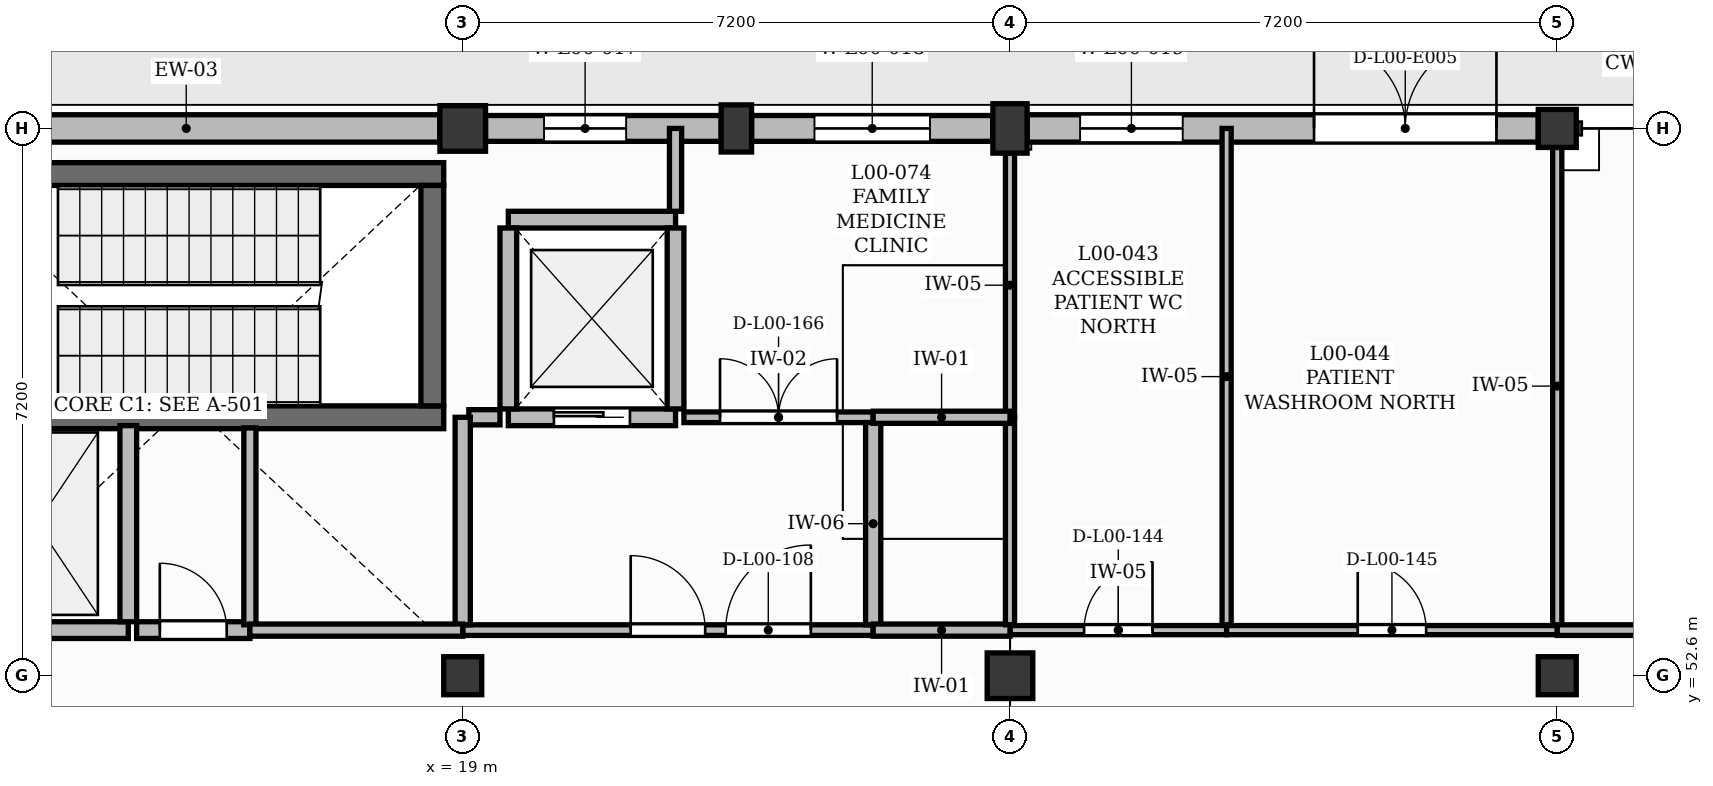
"""IFC4 building model, lengths in metres.
Left out: names, types, materials, properties, quantities, classifications, styles, units other than length and angle.
Written with IfcOpenShell. Run it as: python <this file> out.ifc"""

import sys

from ifc_helpers import new_model, si_unit, direction, frame, frame_2d, origin, origin_2d, place, context, subcontext, project, spatial, rectangle, extrude, element, fill, save


model = new_model("IFC4")
c1 = context("Model", 3, precision=1e-05, world=origin(), true_north=direction((0.0, 1.0)))
c2 = subcontext(c1, "Body", "Model", "MODEL_VIEW")
j1 = project(units=[si_unit("LENGTHUNIT", "METRE"), si_unit("PLANEANGLEUNIT", "RADIAN")], contexts=[c1])
p1 = place(None, origin())
s1 = spatial("IfcSite", under=j1, at=p1, CompositionType="ELEMENT")
p2 = place(p1, origin())
s2 = spatial("IfcBuilding", under=s1, at=p2, CompositionType="ELEMENT")
p3 = place(p2, origin())
s3 = spatial("IfcBuildingStorey", under=s2, at=p3, CompositionType="ELEMENT", Elevation=0.0)
p4 = place(p3, frame((19.0, 52.6, 0.0), z_axis=(0.0, 0.0, 1.0), x_axis=(1.0, 0.0, 0.0)))
e1 = element("IfcColumn", 1, at=p4, inside=s3, PredefinedType="COLUMN", context=c2, shape_type="SweptSolid", body=[
    extrude(rectangle(XDim=0.5, YDim=0.5, at=origin_2d()), origin(), (0.0, 0.0, 1.0), 4.2),
])
for number, where, z_axis, x_axis in (
    (2, (19.0, 59.8, 0.0), (0.0, 0.0, 1.0), (1.0, 0.0, 0.0)),
    (3, (26.2, 52.6, 0.0), (0.0, 0.0, 1.0), (1.0, 0.0, 0.0)),
):
    element("IfcColumn", number, at=place(p3, frame(where, z_axis=z_axis, x_axis=x_axis)), inside=s3, PredefinedType="COLUMN", context=c2, shape_type="SweptSolid", body=[
        extrude(rectangle(XDim=0.6, YDim=0.6, at=origin_2d()), origin(), (0.0, 0.0, 1.0), 4.2),
    ])
p5 = place(p3, frame((26.2, 59.8, 0.0), z_axis=(0.0, 0.0, 1.0), x_axis=(1.0, 0.0, 0.0)))
e4 = element("IfcColumn", 4, at=p5, inside=s3, PredefinedType="COLUMN", context=c2, shape_type="SweptSolid", body=[
    extrude(rectangle(XDim=0.45, YDim=0.65, at=origin_2d()), origin(), (0.0, 0.0, 1.0), 4.2),
])
for number, where, z_axis, x_axis in (
    (5, (33.4, 52.6, 0.0), (0.0, 0.0, 1.0), (1.0, 0.0, 0.0)),
    (6, (33.4, 59.8, 0.0), (0.0, 0.0, 1.0), (1.0, 0.0, 0.0)),
):
    element("IfcColumn", number, at=place(p3, frame(where, z_axis=z_axis, x_axis=x_axis)), inside=s3, PredefinedType="COLUMN", context=c2, shape_type="SweptSolid", body=[
        extrude(rectangle(XDim=0.5, YDim=0.5, at=origin_2d()), origin(), (0.0, 0.0, 1.0), 4.2),
    ])
p6 = place(p3, frame((22.6, 59.8, 0.0), z_axis=(0.0, 0.0, 1.0), x_axis=(1.0, 0.0, 0.0)))
e7 = element("IfcColumn", 7, at=p6, inside=s3, PredefinedType="PILASTER", context=c2, shape_type="SweptSolid", body=[
    extrude(rectangle(XDim=0.4, YDim=0.62, at=origin_2d()), origin(), (0.0, 0.0, 1.0), 4.2),
])
p7 = place(p3, frame((12.025, 59.8, 0.0), z_axis=(0.0, 0.0, 1.0), x_axis=(1.0, 0.0, 0.0)))
e8 = element("IfcWall", 8, at=p7, inside=s3, PredefinedType="SOLIDWALL", context=c2, shape_type="SweptSolid", body=[
    extrude(rectangle(XDim=6.675, YDim=0.36, at=frame_2d((3.337, 0.0))), origin(), (0.0, 0.0, 1.0), 3.68),
])
p8 = place(p3, frame((19.3, 59.8, 0.0), z_axis=(0.0, 0.0, 1.0), x_axis=(1.0, 0.0, 0.0)))
e9 = element("IfcWall", 9, at=p8, inside=s3, PredefinedType="SOLIDWALL", context=c2, shape_type="SweptSolid", body=[
    extrude(rectangle(XDim=3.1, YDim=0.34, at=frame_2d((1.55, 0.0))), origin(), (0.0, 0.0, 1.0), 3.68),
])
p9 = place(p8, frame((0.77, 0.0, 1.0)))
e10 = element("IfcOpeningElement", 10, at=p9, cuts=e9, PredefinedType="OPENING", context=c2, shape_type="SweptSolid", body=[
    extrude(rectangle(XDim=1.08, YDim=1.95, at=frame_2d((0.54, 0.975))), frame((0.0, 0.18, 0.0), z_axis=(0.0, -1.0, 0.0), x_axis=(1.0, 0.0, 0.0)), (0.0, 0.0, 1.0), 0.36),
])
p10 = place(p3, frame((22.8, 59.8, 0.0), z_axis=(0.0, 0.0, 1.0), x_axis=(1.0, 0.0, 0.0)))
e11 = element("IfcWall", 11, at=p10, inside=s3, PredefinedType="SOLIDWALL", context=c2, shape_type="SweptSolid", body=[
    extrude(rectangle(XDim=3.175, YDim=0.34, at=frame_2d((1.587, 0.0))), origin(), (0.0, 0.0, 1.0), 3.68),
])
p11 = place(p10, frame((0.827, 0.0, 1.0)))
e12 = element("IfcOpeningElement", 12, at=p11, cuts=e11, PredefinedType="OPENING", context=c2, shape_type="SweptSolid", body=[
    extrude(rectangle(XDim=1.52, YDim=1.8, at=frame_2d((0.76, 0.9))), frame((0.0, 0.18, 0.0), z_axis=(0.0, -1.0, 0.0), x_axis=(1.0, 0.0, 0.0)), (0.0, 0.0, 1.0), 0.36),
])
p12 = place(p3, frame((26.425, 59.8, 0.0), z_axis=(0.0, 0.0, 1.0), x_axis=(1.0, 0.0, 0.0)))
e13 = element("IfcWall", 13, at=p12, inside=s3, PredefinedType="SOLIDWALL", context=c2, shape_type="SweptSolid", body=[
    extrude(rectangle(XDim=6.725, YDim=0.36, at=frame_2d((3.362, 0.0))), origin(), (0.0, 0.0, 1.0), 3.68),
])
p13 = place(p12, frame((3.775, 0.0, 0.0)))
e14 = element("IfcOpeningElement", 14, at=p13, cuts=e13, PredefinedType="OPENING", context=c2, shape_type="SweptSolid", body=[
    extrude(rectangle(XDim=2.4, YDim=2.8, at=frame_2d((1.2, 1.4))), frame((0.0, 0.19, 0.0), z_axis=(0.0, -1.0, 0.0), x_axis=(1.0, 0.0, 0.0)), (0.0, 0.0, 1.0), 0.38),
])
p14 = place(p12, frame((0.698, 0.0, 1.0)))
e15 = element("IfcOpeningElement", 15, at=p14, cuts=e13, PredefinedType="OPENING", context=c2, shape_type="SweptSolid", body=[
    extrude(rectangle(XDim=1.35, YDim=2.2, at=frame_2d((0.675, 1.1))), frame((0.0, 0.19, 0.0), z_axis=(0.0, -1.0, 0.0), x_axis=(1.0, 0.0, 0.0)), (0.0, 0.0, 1.0), 0.38),
])
for number, where, z_axis, x_axis in (
    (16, (12.05, 56.0, 0.0), (0.0, 0.0, 1.0), (1.0, 0.0, 0.0)),
    (17, (12.05, 59.2, 0.0), (0.0, 0.0, 1.0), (1.0, 0.0, 0.0)),
):
    element("IfcWall", number, at=place(p3, frame(where, z_axis=z_axis, x_axis=x_axis)), inside=s3, PredefinedType="SHEAR", context=c2, shape_type="SweptSolid", body=[
        extrude(rectangle(XDim=6.7, YDim=0.3, at=frame_2d((3.35, 0.0))), origin(), (0.0, 0.0, 1.0), 4.25),
    ])
p15 = place(p3, frame((18.6, 56.15, 0.0), z_axis=(0.0, 0.0, 1.0), x_axis=(0.0, 1.0, 0.0)))
e18 = element("IfcWall", 18, at=p15, inside=s3, PredefinedType="SHEAR", context=c2, shape_type="SweptSolid", body=[
    extrude(rectangle(XDim=2.9, YDim=0.3, at=frame_2d((1.45, 0.0))), origin(), (0.0, 0.0, 1.0), 4.25),
])
p16 = place(p3, frame((12.2, 53.2, 0.0), z_axis=(0.0, 0.0, 1.0), x_axis=(1.0, 0.0, 0.0)))
e19 = element("IfcWall", 19, at=p16, inside=s3, PredefinedType="SOLIDWALL", context=c2, shape_type="SweptSolid", body=[
    extrude(rectangle(XDim=2.4, YDim=0.22, at=frame_2d((1.2, 0.0))), origin(), (0.0, 0.0, 1.0), 4.25),
])
p17 = place(p3, frame((14.6, 53.31, 0.0), z_axis=(0.0, 0.0, 1.0), x_axis=(0.0, 1.0, 0.0)))
e20 = element("IfcWall", 20, at=p17, inside=s3, PredefinedType="SOLIDWALL", context=c2, shape_type="SweptSolid", body=[
    extrude(rectangle(XDim=2.58, YDim=0.22, at=frame_2d((1.29, 0.0))), origin(), (0.0, 0.0, 1.0), 4.25),
])
p18 = place(p3, frame((19.6, 56.0, 0.0), z_axis=(0.0, 0.0, 1.0), x_axis=(1.0, 0.0, 0.0)))
e21 = element("IfcWall", 21, at=p18, inside=s3, PredefinedType="SOLIDWALL", context=c2, shape_type="SweptSolid", body=[
    extrude(rectangle(XDim=2.2, YDim=0.22, at=frame_2d((1.1, 0.0))), origin(), (0.0, 0.0, 1.0), 4.25),
])
p19 = place(p18, frame((0.6, 0.0, 0.0)))
e22 = element("IfcOpeningElement", 22, at=p19, cuts=e21, PredefinedType="OPENING", context=c2, shape_type="SweptSolid", body=[
    extrude(rectangle(XDim=1.0, YDim=2.15, at=frame_2d((0.5, 1.075))), frame((0.0, 0.12, 0.0), z_axis=(0.0, -1.0, 0.0), x_axis=(1.0, 0.0, 0.0)), (0.0, 0.0, 1.0), 0.24),
])
p20 = place(p3, frame((19.6, 58.6, 0.0), z_axis=(0.0, 0.0, 1.0), x_axis=(1.0, 0.0, 0.0)))
e23 = element("IfcWall", 23, at=p20, inside=s3, PredefinedType="SOLIDWALL", context=c2, shape_type="SweptSolid", body=[
    extrude(rectangle(XDim=2.2, YDim=0.22, at=frame_2d((1.1, 0.0))), origin(), (0.0, 0.0, 1.0), 4.25),
])
for number, where, z_axis, x_axis in (
    (24, (19.6, 56.11, 0.0), (0.0, 0.0, 1.0), (0.0, 1.0, 0.0)),
    (25, (21.8, 56.11, 0.0), (0.0, 0.0, 1.0), (0.0, 1.0, 0.0)),
):
    element("IfcWall", number, at=place(p3, frame(where, z_axis=z_axis, x_axis=x_axis)), inside=s3, PredefinedType="SOLIDWALL", context=c2, shape_type="SweptSolid", body=[
        extrude(rectangle(XDim=2.38, YDim=0.22, at=frame_2d((1.19, 0.0))), origin(), (0.0, 0.0, 1.0), 4.25),
    ])
p21 = place(p3, frame((14.71, 53.2, 0.0), z_axis=(0.0, 0.0, 1.0), x_axis=(1.0, 0.0, 0.0)))
e26 = element("IfcWall", 26, at=p21, inside=s3, PredefinedType="SOLIDWALL", context=c2, shape_type="SweptSolid", body=[
    extrude(rectangle(XDim=1.49, YDim=0.22, at=frame_2d((0.745, 0.0))), origin(), (0.0, 0.0, 1.0), 4.18),
])
p22 = place(p21, frame((0.305, 0.0, 0.0)))
e27 = element("IfcOpeningElement", 27, at=p22, cuts=e26, PredefinedType="OPENING", context=c2, shape_type="SweptSolid", body=[
    extrude(rectangle(XDim=0.88, YDim=2.05, at=frame_2d((0.44, 1.025))), frame((0.0, 0.12, 0.0), z_axis=(0.0, -1.0, 0.0), x_axis=(1.0, 0.0, 0.0)), (0.0, 0.0, 1.0), 0.24),
])
p23 = place(p3, frame((19.0, 53.2, 0.0), z_axis=(0.0, 0.0, 1.0), x_axis=(1.0, 0.0, 0.0)))
e28 = element("IfcWall", 28, at=p23, inside=s3, PredefinedType="PARTITIONING", context=c2, shape_type="SweptSolid", body=[
    extrude(rectangle(XDim=5.4, YDim=0.14, at=frame_2d((2.7, 0.0))), origin(), (0.0, 0.0, 1.0), 4.18),
])
p24 = place(p23, frame((2.21, 0.0, 0.0)))
e29 = element("IfcOpeningElement", 29, at=p24, cuts=e28, PredefinedType="OPENING", context=c2, shape_type="SweptSolid", body=[
    extrude(rectangle(XDim=0.98, YDim=2.15, at=frame_2d((0.49, 1.075))), frame((0.0, 0.08, 0.0), z_axis=(0.0, -1.0, 0.0), x_axis=(1.0, 0.0, 0.0)), (0.0, 0.0, 1.0), 0.16),
])
p25 = place(p23, frame((3.46, 0.0, 0.0)))
e30 = element("IfcOpeningElement", 30, at=p25, cuts=e28, PredefinedType="OPENING", context=c2, shape_type="SweptSolid", body=[
    extrude(rectangle(XDim=1.12, YDim=2.15, at=frame_2d((0.56, 1.075))), frame((0.0, 0.08, 0.0), z_axis=(0.0, -1.0, 0.0), x_axis=(1.0, 0.0, 0.0)), (0.0, 0.0, 1.0), 0.16),
])
p26 = place(p3, frame((21.91, 56.0, 0.0), z_axis=(0.0, 0.0, 1.0), x_axis=(1.0, 0.0, 0.0)))
e31 = element("IfcWall", 31, at=p26, inside=s3, PredefinedType="PARTITIONING", context=c2, shape_type="SweptSolid", body=[
    extrude(rectangle(XDim=2.49, YDim=0.14, at=frame_2d((1.245, 0.0))), origin(), (0.0, 0.0, 1.0), 4.18),
])
p27 = place(p26, frame((0.475, 0.0, 0.0)))
e32 = element("IfcOpeningElement", 32, at=p27, cuts=e31, PredefinedType="OPENING", context=c2, shape_type="SweptSolid", body=[
    extrude(rectangle(XDim=1.54, YDim=2.25, at=frame_2d((0.77, 1.125))), frame((0.0, 0.08, 0.0), z_axis=(0.0, -1.0, 0.0), x_axis=(1.0, 0.0, 0.0)), (0.0, 0.0, 1.0), 0.16),
])
p28 = place(p3, frame((26.2, 53.2, 0.0), z_axis=(0.0, 0.0, 1.0), x_axis=(1.0, 0.0, 0.0)))
e33 = element("IfcWall", 33, at=p28, inside=s3, PredefinedType="PLUMBINGWALL", context=c2, shape_type="SweptSolid", body=[
    extrude(rectangle(XDim=2.85, YDim=0.12, at=frame_2d((1.425, 0.0))), origin(), (0.0, 0.0, 1.0), 4.18),
])
p29 = place(p28, frame((0.975, 0.0, 0.0)))
e34 = element("IfcOpeningElement", 34, at=p29, cuts=e33, PredefinedType="OPENING", context=c2, shape_type="SweptSolid", body=[
    extrude(rectangle(XDim=0.9, YDim=2.1, at=frame_2d((0.45, 1.05))), frame((0.0, 0.07, 0.0), z_axis=(0.0, -1.0, 0.0), x_axis=(1.0, 0.0, 0.0)), (0.0, 0.0, 1.0), 0.14),
])
p30 = place(p3, frame((26.2, 56.0, 0.0), z_axis=(0.0, 0.0, 1.0), x_axis=(0.0, 1.0, 0.0)))
e35 = element("IfcWall", 35, at=p30, inside=s3, PredefinedType="PLUMBINGWALL", context=c2, shape_type="SweptSolid", body=[
    extrude(rectangle(XDim=3.475, YDim=0.12, at=frame_2d((1.738, 0.0))), origin(), (0.0, 0.0, 1.0), 3.5),
])
p31 = place(p3, frame((29.05, 53.27, 0.0), z_axis=(0.0, 0.0, 1.0), x_axis=(0.0, 1.0, 0.0)))
e36 = element("IfcWall", 36, at=p31, inside=s3, PredefinedType="PLUMBINGWALL", context=c2, shape_type="SweptSolid", body=[
    extrude(rectangle(XDim=6.53, YDim=0.12, at=frame_2d((3.265, 0.0))), origin(), (0.0, 0.0, 1.0), 4.18),
])
p32 = place(p3, frame((29.05, 53.2, 0.0), z_axis=(0.0, 0.0, 1.0), x_axis=(1.0, 0.0, 0.0)))
e37 = element("IfcWall", 37, at=p32, inside=s3, PredefinedType="PLUMBINGWALL", context=c2, shape_type="SweptSolid", body=[
    extrude(rectangle(XDim=4.35, YDim=0.12, at=frame_2d((2.175, 0.0))), origin(), (0.0, 0.0, 1.0), 4.18),
])
p33 = place(p32, frame((1.725, 0.0, 0.0)))
e38 = element("IfcOpeningElement", 38, at=p33, cuts=e37, PredefinedType="OPENING", context=c2, shape_type="SweptSolid", body=[
    extrude(rectangle(XDim=0.9, YDim=2.1, at=frame_2d((0.45, 1.05))), frame((0.0, 0.07, 0.0), z_axis=(0.0, -1.0, 0.0), x_axis=(1.0, 0.0, 0.0)), (0.0, 0.0, 1.0), 0.14),
])
p34 = place(p3, frame((33.4, 53.27, 0.0), z_axis=(0.0, 0.0, 1.0), x_axis=(0.0, 1.0, 0.0)))
e39 = element("IfcWall", 39, at=p34, inside=s3, PredefinedType="PLUMBINGWALL", context=c2, shape_type="SweptSolid", body=[
    extrude(rectangle(XDim=6.28, YDim=0.12, at=frame_2d((3.14, 0.0))), origin(), (0.0, 0.0, 1.0), 3.5),
])
p35 = place(p3, frame((33.4, 53.2, 0.0), z_axis=(0.0, 0.0, 1.0), x_axis=(1.0, 0.0, 0.0)))
e40 = element("IfcWall", 40, at=p35, inside=s3, PredefinedType="PARTITIONING", context=c2, shape_type="SweptSolid", body=[
    extrude(rectangle(XDim=7.2, YDim=0.14, at=frame_2d((3.6, 0.0))), origin(), (0.0, 0.0, 1.0), 4.18),
])
p36 = place(p35, frame((2.83, 0.0, 0.0)))
e41 = element("IfcOpeningElement", 41, at=p36, cuts=e40, PredefinedType="OPENING", context=c2, shape_type="SweptSolid", body=[
    extrude(rectangle(XDim=1.54, YDim=2.25, at=frame_2d((0.77, 1.125))), frame((0.0, 0.08, 0.0), z_axis=(0.0, -1.0, 0.0), x_axis=(1.0, 0.0, 0.0)), (0.0, 0.0, 1.0), 0.16),
])
p37 = place(p3, frame((16.2, 53.27, 0.0), z_axis=(0.0, 0.0, 1.0), x_axis=(0.0, 1.0, 0.0)))
e42 = element("IfcWall", 42, at=p37, inside=s3, PredefinedType="PARTITIONING", context=c2, shape_type="SweptSolid", body=[
    extrude(rectangle(XDim=2.59, YDim=0.16, at=frame_2d((1.295, 0.0))), origin(), (0.0, 0.0, 1.0), 4.18),
])
p38 = place(p3, frame((24.4, 53.27, 0.0), z_axis=(0.0, 0.0, 1.0), x_axis=(0.0, 1.0, 0.0)))
e43 = element("IfcWall", 43, at=p38, inside=s3, PredefinedType="PARTITIONING", context=c2, shape_type="SweptSolid", body=[
    extrude(rectangle(XDim=2.66, YDim=0.2, at=frame_2d((1.33, 0.0))), origin(), (0.0, 0.0, 1.0), 4.18),
])
p39 = place(p3, frame((19.49, 56.0, 0.0), z_axis=(0.0, 0.0, 1.0), x_axis=(-1.0, 0.0, 0.0)))
e44 = element("IfcWall", 44, at=p39, inside=s3, PredefinedType="PARTITIONING", context=c2, shape_type="SweptSolid", body=[
    extrude(rectangle(XDim=0.41, YDim=0.2, at=frame_2d((0.205, 0.0))), origin(), (0.0, 0.0, 1.0), 4.18),
])
p40 = place(p3, frame((19.0, 53.27, 0.0), z_axis=(0.0, 0.0, 1.0), x_axis=(0.0, 1.0, 0.0)))
e45 = element("IfcWall", 45, at=p40, inside=s3, PredefinedType="PARTITIONING", context=c2, shape_type="SweptSolid", body=[
    extrude(rectangle(XDim=2.73, YDim=0.2, at=frame_2d((1.365, 0.0))), origin(), (0.0, 0.0, 1.0), 3.5),
])
p41 = place(p3, frame((26.2, 53.2, 0.0), z_axis=(0.0, 0.0, 1.0), x_axis=(-1.0, 0.0, 0.0)))
e46 = element("IfcWall", 46, at=p41, inside=s3, PredefinedType="PARTITIONING", context=c2, shape_type="SweptSolid", body=[
    extrude(rectangle(XDim=1.8, YDim=0.16, at=frame_2d((0.9, 0.0))), origin(), (0.0, 0.0, 1.0), 4.18),
])
p42 = place(p3, frame((19.0, 53.2, 0.0), z_axis=(0.0, 0.0, 1.0), x_axis=(-1.0, 0.0, 0.0)))
e47 = element("IfcWall", 47, at=p42, inside=s3, PredefinedType="PARTITIONING", context=c2, shape_type="SweptSolid", body=[
    extrude(rectangle(XDim=2.8, YDim=0.16, at=frame_2d((1.4, 0.0))), origin(), (0.0, 0.0, 1.0), 4.18),
])
p43 = place(p3, frame((26.2, 53.27, 0.0), z_axis=(0.0, 0.0, 1.0), x_axis=(0.0, 1.0, 0.0)))
e48 = element("IfcWall", 48, at=p43, inside=s3, PredefinedType="PLUMBINGWALL", context=c2, shape_type="SweptSolid", body=[
    extrude(rectangle(XDim=2.73, YDim=0.12, at=frame_2d((1.365, 0.0))), origin(), (0.0, 0.0, 1.0), 3.5),
])
p44 = place(p3, frame((24.4, 56.0, 0.0), z_axis=(0.0, 0.0, 1.0), x_axis=(1.0, 0.0, 0.0)))
e49 = element("IfcWall", 49, at=p44, inside=s3, PredefinedType="PARTITIONING", context=c2, shape_type="SweptSolid", body=[
    extrude(rectangle(XDim=1.8, YDim=0.16, at=frame_2d((0.9, 0.0))), origin(), (0.0, 0.0, 1.0), 4.18),
])
p45 = place(p3, frame((21.8, 58.71, 0.0), z_axis=(0.0, 0.0, 1.0), x_axis=(0.0, 1.0, 0.0)))
e50 = element("IfcWall", 50, at=p45, inside=s3, PredefinedType="PARTITIONING", context=c2, shape_type="SweptSolid", body=[
    extrude(rectangle(XDim=1.09, YDim=0.16, at=frame_2d((0.545, 0.0))), origin(), (0.0, 0.0, 1.0), 4.18),
])
p46 = place(p9, origin())
e51 = element("IfcWindow", 51, at=p46, inside=s3, PartitioningType="SINGLE_PANEL", PredefinedType="WINDOW", context=c2, shape_type="SweptSolid", body=[
    extrude(rectangle(XDim=1.08, YDim=1.95, at=frame_2d((0.54, 0.975))), frame((0.0, 0.03, 0.0), z_axis=(0.0, -1.0, 0.0), x_axis=(1.0, 0.0, 0.0)), (0.0, 0.0, 1.0), 0.06),
])
fill(e10, e51)
p47 = place(p11, origin())
e52 = element("IfcWindow", 52, at=p47, inside=s3, PartitioningType="DOUBLE_PANEL_VERTICAL", PredefinedType="WINDOW", context=c2, shape_type="SweptSolid", body=[
    extrude(rectangle(XDim=1.52, YDim=1.8, at=frame_2d((0.76, 0.9))), frame((0.0, 0.03, 0.0), z_axis=(0.0, -1.0, 0.0), x_axis=(1.0, 0.0, 0.0)), (0.0, 0.0, 1.0), 0.06),
])
fill(e12, e52)
p48 = place(p13, origin())
e53 = element("IfcDoor", 53, at=p48, inside=s3, OperationType="DOUBLE_DOOR_SINGLE_SWING", PredefinedType="DOOR", context=c2, shape_type="SweptSolid", body=[
    extrude(rectangle(XDim=2.4, YDim=2.8, at=frame_2d((1.2, 1.4))), frame((0.0, 0.025, 0.0), z_axis=(0.0, -1.0, 0.0), x_axis=(1.0, 0.0, 0.0)), (0.0, 0.0, 1.0), 0.05),
])
fill(e14, e53)
p49 = place(p14, origin())
e54 = element("IfcWindow", 54, at=p49, inside=s3, PartitioningType="SINGLE_PANEL", PredefinedType="WINDOW", context=c2, shape_type="SweptSolid", body=[
    extrude(rectangle(XDim=1.35, YDim=2.2, at=frame_2d((0.675, 1.1))), frame((0.0, 0.03, 0.0), z_axis=(0.0, -1.0, 0.0), x_axis=(1.0, 0.0, 0.0)), (0.0, 0.0, 1.0), 0.06),
])
fill(e15, e54)
p50 = place(p19, origin())
e55 = element("IfcDoor", 55, at=p50, inside=s3, OperationType="SLIDING_TO_LEFT", PredefinedType="DOOR", context=c2, shape_type="SweptSolid", body=[
    extrude(rectangle(XDim=1.0, YDim=2.15, at=frame_2d((0.5, 1.075))), frame((0.0, 0.025, 0.0), z_axis=(0.0, -1.0, 0.0), x_axis=(1.0, 0.0, 0.0)), (0.0, 0.0, 1.0), 0.05),
])
fill(e22, e55)
p51 = place(p24, origin())
e56 = element("IfcDoor", 56, at=p51, inside=s3, OperationType="SINGLE_SWING_LEFT", PredefinedType="DOOR", context=c2, shape_type="SweptSolid", body=[
    extrude(rectangle(XDim=0.98, YDim=2.15, at=frame_2d((0.49, 1.075))), frame((0.0, 0.025, 0.0), z_axis=(0.0, -1.0, 0.0), x_axis=(1.0, 0.0, 0.0)), (0.0, 0.0, 1.0), 0.05),
])
fill(e29, e56)
p52 = place(p25, origin())
e57 = element("IfcDoor", 57, at=p52, inside=s3, OperationType="SINGLE_SWING_RIGHT", PredefinedType="DOOR", context=c2, shape_type="SweptSolid", body=[
    extrude(rectangle(XDim=1.12, YDim=2.15, at=frame_2d((0.56, 1.075))), frame((0.0, 0.025, 0.0), z_axis=(0.0, -1.0, 0.0), x_axis=(1.0, 0.0, 0.0)), (0.0, 0.0, 1.0), 0.05),
])
fill(e30, e57)
p53 = place(p22, origin())
e58 = element("IfcDoor", 58, at=p53, inside=s3, OperationType="SINGLE_SWING_LEFT", PredefinedType="DOOR", context=c2, shape_type="SweptSolid", body=[
    extrude(rectangle(XDim=0.88, YDim=2.05, at=frame_2d((0.44, 1.025))), frame((0.0, 0.025, 0.0), z_axis=(0.0, -1.0, 0.0), x_axis=(1.0, 0.0, 0.0)), (0.0, 0.0, 1.0), 0.05),
])
fill(e27, e58)
p54 = place(p29, origin())
e59 = element("IfcDoor", 59, at=p54, inside=s3, OperationType="SINGLE_SWING_RIGHT", PredefinedType="DOOR", context=c2, shape_type="SweptSolid", body=[
    extrude(rectangle(XDim=0.9, YDim=2.1, at=frame_2d((0.45, 1.05))), frame((0.0, 0.025, 0.0), z_axis=(0.0, -1.0, 0.0), x_axis=(1.0, 0.0, 0.0)), (0.0, 0.0, 1.0), 0.05),
])
fill(e34, e59)
p55 = place(p33, origin())
e60 = element("IfcDoor", 60, at=p55, inside=s3, OperationType="SINGLE_SWING_LEFT", PredefinedType="DOOR", context=c2, shape_type="SweptSolid", body=[
    extrude(rectangle(XDim=0.9, YDim=2.1, at=frame_2d((0.45, 1.05))), frame((0.0, 0.025, 0.0), z_axis=(0.0, -1.0, 0.0), x_axis=(1.0, 0.0, 0.0)), (0.0, 0.0, 1.0), 0.05),
])
fill(e38, e60)
p56 = place(p27, origin())
e61 = element("IfcDoor", 61, at=p56, inside=s3, OperationType="DOUBLE_DOOR_SINGLE_SWING", PredefinedType="DOOR", context=c2, shape_type="SweptSolid", body=[
    extrude(rectangle(XDim=1.54, YDim=2.25, at=frame_2d((0.77, 1.125))), frame((0.0, 0.025, 0.0), z_axis=(0.0, -1.0, 0.0), x_axis=(1.0, 0.0, 0.0)), (0.0, 0.0, 1.0), 0.05),
])
fill(e32, e61)
save(model, sys.argv[1])
